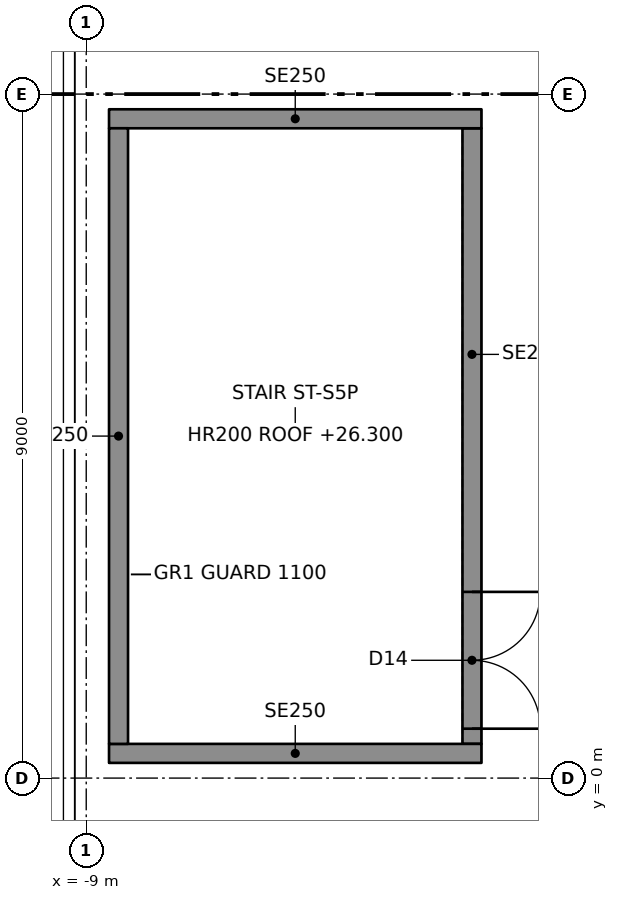
"""IFC4 building model, lengths in metres.
Left out: names, types, materials, properties, quantities, classifications, styles, units other than length and angle.
Written with IfcOpenShell. Run it as: python <this file> out.ifc"""

import sys

from ifc_helpers import new_model, si_unit, direction, frame, frame_2d, origin, place, context, subcontext, project, spatial, rectangle, extrude, element, fill, save


model = new_model("IFC4")
c1 = context("Model", 3, precision=1e-05, world=origin(), true_north=direction((0.0, 1.0)))
c2 = subcontext(c1, "Body", "Model", "MODEL_VIEW")
j1 = project(units=[si_unit("LENGTHUNIT", "METRE"), si_unit("PLANEANGLEUNIT", "RADIAN")], contexts=[c1])
p1 = place(None, origin())
s1 = spatial("IfcSite", under=j1, at=p1, CompositionType="ELEMENT")
p2 = place(p1, origin())
s2 = spatial("IfcBuilding", under=s1, at=p2, CompositionType="ELEMENT")
p3 = place(p2, frame((0.0, 0.0, 23.0)))
s3 = spatial("IfcBuildingStorey", under=s2, at=p3, CompositionType="ELEMENT", Elevation=23.0)
for number, where, z_axis, x_axis in (
    (1, (-8.7, 0.325, 0.0), (0.0, 0.0, 1.0), (1.0, 0.0, 0.0)),
    (2, (-8.7, 8.675, 0.0), (0.0, 0.0, 1.0), (1.0, 0.0, 0.0)),
):
    element("IfcWall", number, at=place(p3, frame(where, z_axis=z_axis, x_axis=x_axis)), inside=s3, PredefinedType="SOLIDWALL", context=c2, shape_type="SweptSolid", body=[
        extrude(rectangle(XDim=4.9, YDim=0.25, at=frame_2d((2.45, 0.0))), origin(), (0.0, 0.0, 1.0), 3.1),
    ])
p4 = place(p3, frame((-8.575, 0.45, 0.0), z_axis=(0.0, 0.0, 1.0), x_axis=(0.0, 1.0, 0.0)))
e3 = element("IfcWall", 3, at=p4, inside=s3, PredefinedType="SOLIDWALL", context=c2, shape_type="SweptSolid", body=[
    extrude(rectangle(XDim=8.1, YDim=0.25, at=frame_2d((4.05, 0.0))), origin(), (0.0, 0.0, 1.0), 3.1),
])
p5 = place(p3, frame((-3.925, 0.45, 0.0), z_axis=(0.0, 0.0, 1.0), x_axis=(0.0, 1.0, 0.0)))
e4 = element("IfcWall", 4, at=p5, inside=s3, PredefinedType="SOLIDWALL", context=c2, shape_type="SweptSolid", body=[
    extrude(rectangle(XDim=8.1, YDim=0.25, at=frame_2d((4.05, 0.0))), origin(), (0.0, 0.0, 1.0), 3.1),
])
p6 = place(p5, frame((0.2, 0.0, 0.0)))
e5 = element("IfcOpeningElement", 5, at=p6, cuts=e4, PredefinedType="OPENING", context=c2, shape_type="SweptSolid", body=[
    extrude(rectangle(XDim=1.8, YDim=2.1, at=frame_2d((0.9, 1.05))), frame((0.0, 0.135, 0.0), z_axis=(0.0, -1.0, 0.0), x_axis=(1.0, 0.0, 0.0)), (0.0, 0.0, 1.0), 0.27),
])
p7 = place(p6, frame((1.8, 0.0, 0.0), z_axis=(0.0, 0.0, 1.0), x_axis=(-1.0, 0.0, 0.0)))
e6 = element("IfcDoor", 6, at=p7, inside=s3, OperationType="DOUBLE_DOOR_SINGLE_SWING", PredefinedType="DOOR", context=c2, shape_type="SweptSolid", body=[
    extrude(rectangle(XDim=1.8, YDim=2.1, at=frame_2d((0.9, 1.05))), frame((0.0, 0.025, 0.0), z_axis=(0.0, -1.0, 0.0), x_axis=(1.0, 0.0, 0.0)), (0.0, 0.0, 1.0), 0.05),
])
fill(e5, e6)
save(model, sys.argv[1])
